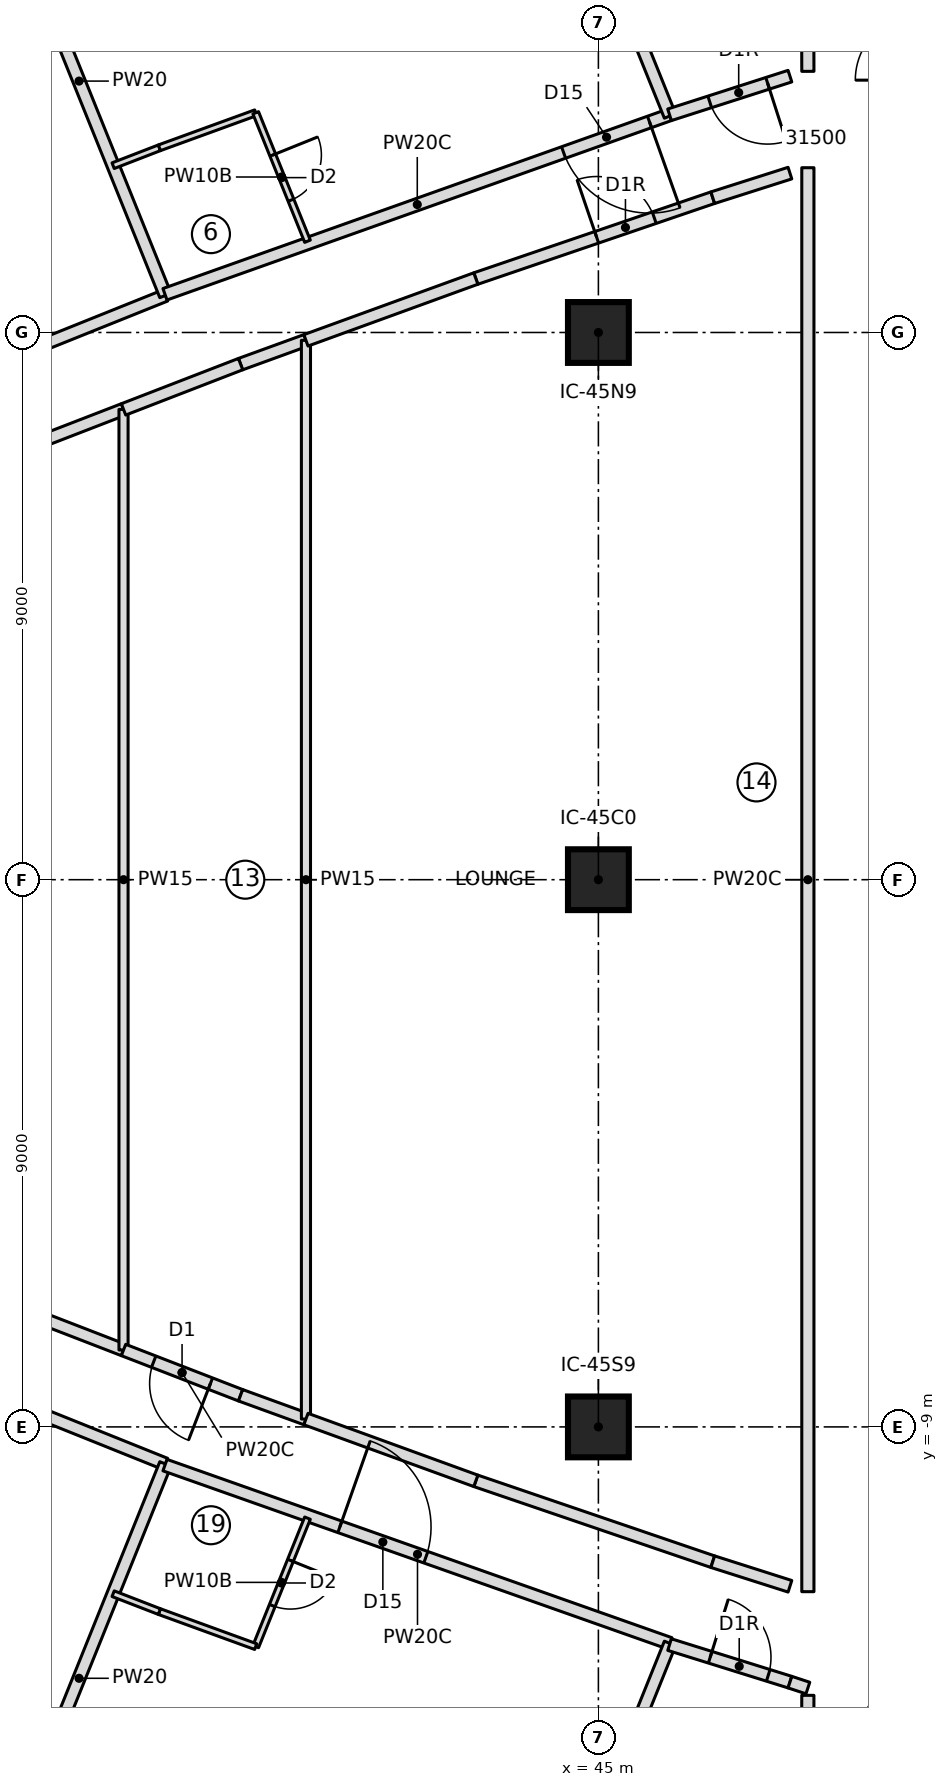
"""IFC4 building model, lengths in metres.
Left out: names, types, materials, properties, quantities, classifications, styles, units other than length and angle.
Written with IfcOpenShell. Run it as: python <this file> out.ifc"""

import sys

from ifc_helpers import new_model, si_unit, direction, frame, frame_2d, origin, origin_2d, place, context, subcontext, project, spatial, rectangle, extrude, element, fill, save


model = new_model("IFC4")
c1 = context("Model", 3, precision=1e-05, world=origin(), true_north=direction((0.0, 1.0)))
c2 = subcontext(c1, "Body", "Model", "MODEL_VIEW")
j1 = project(units=[si_unit("LENGTHUNIT", "METRE"), si_unit("PLANEANGLEUNIT", "RADIAN")], contexts=[c1])
p1 = place(None, origin())
s1 = spatial("IfcSite", under=j1, at=p1, CompositionType="ELEMENT")
p2 = place(p1, origin())
s2 = spatial("IfcBuilding", under=s1, at=p2, CompositionType="ELEMENT")
p3 = place(p2, frame((0.0, 0.0, 196.8)))
s3 = spatial("IfcBuildingStorey", under=s2, at=p3, CompositionType="ELEMENT", Elevation=196.8)
for number, where, z_axis, x_axis in (
    (1, (45.0, -9.0, 0.0), (0.0, 0.0, 1.0), (1.0, 0.0, 0.0)),
    (2, (45.0, 0.0, 0.0), (0.0, 0.0, 1.0), (1.0, 0.0, 0.0)),
    (3, (45.0, 9.0, 0.0), (0.0, 0.0, 1.0), (1.0, 0.0, 0.0)),
):
    element("IfcColumn", number, at=place(p3, frame(where, z_axis=z_axis, x_axis=x_axis)), inside=s3, PredefinedType="COLUMN", context=c2, shape_type="SweptSolid", body=[
        extrude(rectangle(XDim=1.0, YDim=1.0, at=origin_2d()), origin(), (0.0, 0.0, 1.0), 3.55),
    ])
p4 = place(p3, frame((29.714, 6.329, 0.0), z_axis=(0.0, 0.0, 1.0), x_axis=(0.927886226391, 0.372863448026, 0.0)))
e4 = element("IfcWall", 4, at=p4, inside=s3, PredefinedType="PARTITIONING", context=c2, shape_type="SweptSolid", body=[
    extrude(rectangle(XDim=8.8, YDim=0.2, at=frame_2d((4.4, 0.0))), origin(), (0.0, 0.0, 1.0), 3.25),
])
p5 = place(p4, frame((3.25, 0.0, 0.0)))
e5 = element("IfcOpeningElement", 5, at=p5, cuts=e4, PredefinedType="OPENING", context=c2, shape_type="SweptSolid", body=[
    extrude(rectangle(XDim=1.0, YDim=2.1, at=frame_2d((0.5, 1.05))), frame((0.0, 0.11, 0.0), z_axis=(0.0, -1.0, 0.0), x_axis=(1.0, 0.0, 0.0)), (0.0, 0.0, 1.0), 0.22),
])
p6 = place(p3, frame((37.88, 9.61, 0.0), z_axis=(0.0, 0.0, 1.0), x_axis=(-0.373892577014, 0.927472016211, 0.0)))
e6 = element("IfcWall", 6, at=p6, inside=s3, PredefinedType="PARTITIONING", context=c2, shape_type="SweptSolid", body=[
    extrude(rectangle(XDim=7.601, YDim=0.2, at=frame_2d((3.8, 0.0))), origin(), (0.0, 0.0, 1.0), 3.25),
])
p7 = place(p3, frame((46.17, 12.58, 0.0), z_axis=(0.0, 0.0, 1.0), x_axis=(-0.942170738702, -0.335133255786, 0.0)))
e7 = element("IfcWall", 7, at=p7, inside=s3, PredefinedType="PARTITIONING", context=c2, shape_type="SweptSolid", body=[
    extrude(rectangle(XDim=8.807, YDim=0.2, at=frame_2d((4.404, 0.0))), origin(), (0.0, 0.0, 1.0), 3.25),
])
p8 = place(p7, frame((0.35, 0.0, 0.0)))
e8 = element("IfcOpeningElement", 8, at=p8, cuts=e7, PredefinedType="OPENING", context=c2, shape_type="SweptSolid", body=[
    extrude(rectangle(XDim=1.5, YDim=2.1, at=frame_2d((0.75, 1.05))), frame((0.0, 0.11, 0.0), z_axis=(0.0, -1.0, 0.0), x_axis=(1.0, 0.0, 0.0)), (0.0, 0.0, 1.0), 0.22),
])
p9 = place(p3, frame((37.02, 11.743, 0.0), z_axis=(0.0, 0.0, 1.0), x_axis=(0.9326493613, 0.360784102846, 0.0)))
e9 = element("IfcWall", 9, at=p9, inside=s3, PredefinedType="PARTITIONING", context=c2, shape_type="SweptSolid", body=[
    extrude(rectangle(XDim=0.815, YDim=0.1, at=frame_2d((0.408, 0.0))), origin(), (0.0, 0.0, 1.0), 3.25),
])
p10 = place(p3, frame((37.78, 12.037, 0.0), z_axis=(0.0, 0.0, 1.0), x_axis=(0.939759586286, 0.341836101053, 0.0)))
e10 = element("IfcWall", 10, at=p10, inside=s3, PredefinedType="PARTITIONING", context=c2, shape_type="SweptSolid", body=[
    extrude(rectangle(XDim=1.686, YDim=0.1, at=frame_2d((0.843, 0.0))), origin(), (0.0, 0.0, 1.0), 3.25),
])
p11 = place(p3, frame((39.364, 12.614, 0.0), z_axis=(0.0, 0.0, 1.0), x_axis=(0.373883593317, -0.927475637765, 0.0)))
e11 = element("IfcWall", 11, at=p11, inside=s3, PredefinedType="PARTITIONING", context=c2, shape_type="SweptSolid", body=[
    extrude(rectangle(XDim=2.278, YDim=0.1, at=frame_2d((1.139, 0.0))), origin(), (0.0, 0.0, 1.0), 3.25),
])
p12 = place(p11, frame((0.75, 0.0, 0.0)))
e12 = element("IfcOpeningElement", 12, at=p12, cuts=e11, PredefinedType="OPENING", context=c2, shape_type="SweptSolid", body=[
    extrude(rectangle(XDim=0.8, YDim=2.1, at=frame_2d((0.4, 1.05))), frame((0.0, 0.06, 0.0), z_axis=(0.0, -1.0, 0.0), x_axis=(1.0, 0.0, 0.0)), (0.0, 0.0, 1.0), 0.12),
])
p13 = place(p3, frame((46.178, 12.562, 0.0), z_axis=(0.0, 0.0, 1.0), x_axis=(-0.373905590149, 0.927466770108, 0.0)))
e13 = element("IfcWall", 13, at=p13, inside=s3, PredefinedType="PARTITIONING", context=c2, shape_type="SweptSolid", body=[
    extrude(rectangle(XDim=7.611, YDim=0.2, at=frame_2d((3.806, 0.0))), origin(), (0.0, 0.0, 1.0), 3.25),
])
p14 = place(p3, frame((29.714, -6.329, 0.0), z_axis=(0.0, 0.0, 1.0), x_axis=(0.927886226391, -0.372863448026, 0.0)))
e14 = element("IfcWall", 14, at=p14, inside=s3, PredefinedType="PARTITIONING", context=c2, shape_type="SweptSolid", body=[
    extrude(rectangle(XDim=8.8, YDim=0.2, at=frame_2d((4.4, 0.0))), origin(), (0.0, 0.0, 1.0), 3.25),
])
p15 = place(p14, frame((3.25, 0.0, 0.0)))
e15 = element("IfcOpeningElement", 15, at=p15, cuts=e14, PredefinedType="OPENING", context=c2, shape_type="SweptSolid", body=[
    extrude(rectangle(XDim=1.0, YDim=2.1, at=frame_2d((0.5, 1.05))), frame((0.0, 0.11, 0.0), z_axis=(0.0, -1.0, 0.0), x_axis=(1.0, 0.0, 0.0)), (0.0, 0.0, 1.0), 0.22),
])
p16 = place(p3, frame((35.038, -16.659, 0.0), z_axis=(0.0, 0.0, 1.0), x_axis=(0.373892577014, 0.927472016211, 0.0)))
e16 = element("IfcWall", 16, at=p16, inside=s3, PredefinedType="PARTITIONING", context=c2, shape_type="SweptSolid", body=[
    extrude(rectangle(XDim=7.601, YDim=0.2, at=frame_2d((3.8, 0.0))), origin(), (0.0, 0.0, 1.0), 3.25),
])
p17 = place(p3, frame((37.872, -9.628, 0.0), z_axis=(0.0, 0.0, 1.0), x_axis=(0.9429299378, -0.332991189675, 0.0)))
e17 = element("IfcWall", 17, at=p17, inside=s3, PredefinedType="PARTITIONING", context=c2, shape_type="SweptSolid", body=[
    extrude(rectangle(XDim=8.808, YDim=0.2, at=frame_2d((4.404, 0.0))), origin(), (0.0, 0.0, 1.0), 3.25),
])
p18 = place(p17, frame((3.05, 0.0, 0.0)))
e18 = element("IfcOpeningElement", 18, at=p18, cuts=e17, PredefinedType="OPENING", context=c2, shape_type="SweptSolid", body=[
    extrude(rectangle(XDim=1.5, YDim=2.1, at=frame_2d((0.75, 1.05))), frame((0.0, 0.11, 0.0), z_axis=(0.0, -1.0, 0.0), x_axis=(1.0, 0.0, 0.0)), (0.0, 0.0, 1.0), 0.22),
])
p19 = place(p3, frame((40.216, -10.5, 0.0), z_axis=(0.0, 0.0, 1.0), x_axis=(-0.373883593317, -0.927475637765, 0.0)))
e19 = element("IfcWall", 19, at=p19, inside=s3, PredefinedType="PARTITIONING", context=c2, shape_type="SweptSolid", body=[
    extrude(rectangle(XDim=2.278, YDim=0.1, at=frame_2d((1.139, 0.0))), origin(), (0.0, 0.0, 1.0), 3.25),
])
p20 = place(p19, frame((0.75, 0.0, 0.0)))
e20 = element("IfcOpeningElement", 20, at=p20, cuts=e19, PredefinedType="OPENING", context=c2, shape_type="SweptSolid", body=[
    extrude(rectangle(XDim=0.8, YDim=2.1, at=frame_2d((0.4, 1.05))), frame((0.0, 0.06, 0.0), z_axis=(0.0, -1.0, 0.0), x_axis=(1.0, 0.0, 0.0)), (0.0, 0.0, 1.0), 0.12),
])
p21 = place(p3, frame((39.364, -12.614, 0.0), z_axis=(0.0, 0.0, 1.0), x_axis=(-0.939759586286, 0.341836101053, 0.0)))
e21 = element("IfcWall", 21, at=p21, inside=s3, PredefinedType="PARTITIONING", context=c2, shape_type="SweptSolid", body=[
    extrude(rectangle(XDim=1.686, YDim=0.1, at=frame_2d((0.843, 0.0))), origin(), (0.0, 0.0, 1.0), 3.25),
])
p22 = place(p3, frame((37.78, -12.037, 0.0), z_axis=(0.0, 0.0, 1.0), x_axis=(-0.9326493613, 0.360784102846, 0.0)))
e22 = element("IfcWall", 22, at=p22, inside=s3, PredefinedType="PARTITIONING", context=c2, shape_type="SweptSolid", body=[
    extrude(rectangle(XDim=0.815, YDim=0.1, at=frame_2d((0.408, 0.0))), origin(), (0.0, 0.0, 1.0), 3.25),
])
p23 = place(p3, frame((43.332, -19.621, 0.0), z_axis=(0.0, 0.0, 1.0), x_axis=(0.373905590149, 0.927466770108, 0.0)))
e23 = element("IfcWall", 23, at=p23, inside=s3, PredefinedType="PARTITIONING", context=c2, shape_type="SweptSolid", body=[
    extrude(rectangle(XDim=7.611, YDim=0.2, at=frame_2d((3.806, 0.0))), origin(), (0.0, 0.0, 1.0), 3.25),
])
for number, where, z_axis, x_axis in (
    (24, (35.276, 6.994, 0.0), (0.0, 0.0, 1.0), (0.933, 0.361, 0.0)),
    (25, (37.19, -7.735, 0.0), (0.0, 0.0, 1.0), (-0.933, 0.361, 0.0)),
):
    element("IfcWall", number, at=place(p3, frame(where, z_axis=z_axis, x_axis=x_axis)), inside=s3, PredefinedType="PARTITIONING", context=c2, shape_type="SweptSolid", body=[
        extrude(rectangle(XDim=2.053, YDim=0.2, at=frame_2d((1.026, 0.0))), origin(), (0.0, 0.0, 1.0), 3.25),
    ])
p24 = place(p3, frame((37.19, -7.735, 0.0), z_axis=(0.0, 0.0, 1.0), x_axis=(0.0, 1.0, 0.0)))
e26 = element("IfcWall", 26, at=p24, inside=s3, PredefinedType="PARTITIONING", context=c2, shape_type="SweptSolid", body=[
    extrude(rectangle(XDim=15.47, YDim=0.15, at=frame_2d((7.735, 0.0))), origin(), (0.0, 0.0, 1.0), 3.25),
])
p25 = place(p3, frame((39.115, -8.479, 0.0), z_axis=(0.0, 0.0, 1.0), x_axis=(-0.9326579855, 0.360761807961, 0.0)))
e27 = element("IfcWall", 27, at=p25, inside=s3, PredefinedType="PARTITIONING", context=c2, shape_type="SweptSolid", body=[
    extrude(rectangle(XDim=2.064, YDim=0.2, at=frame_2d((1.032, 0.0))), origin(), (0.0, 0.0, 1.0), 3.25),
])
p26 = place(p25, frame((0.532, 0.0, 0.0)))
e28 = element("IfcOpeningElement", 28, at=p26, cuts=e27, PredefinedType="OPENING", context=c2, shape_type="SweptSolid", body=[
    extrude(rectangle(XDim=1.0, YDim=2.1, at=frame_2d((0.5, 1.05))), frame((0.0, 0.11, 0.0), z_axis=(0.0, -1.0, 0.0), x_axis=(1.0, 0.0, 0.0)), (0.0, 0.0, 1.0), 0.22),
])
for number, where, z_axis, x_axis in (
    (29, (39.115, 8.479, 0.0), (0.0, 0.0, 1.0), (0.94, 0.342, 0.0)),
    (30, (40.19, -8.871, 0.0), (0.0, 0.0, 1.0), (-0.94, 0.342, 0.0)),
):
    element("IfcWall", number, at=place(p3, frame(where, z_axis=z_axis, x_axis=x_axis)), inside=s3, PredefinedType="PARTITIONING", context=c2, shape_type="SweptSolid", body=[
        extrude(rectangle(XDim=1.144, YDim=0.2, at=frame_2d((0.572, 0.0))), origin(), (0.0, 0.0, 1.0), 3.25),
    ])
p27 = place(p3, frame((37.19, 7.735, 0.0), z_axis=(0.0, 0.0, 1.0), x_axis=(0.9326579855, 0.360761807961, 0.0)))
e31 = element("IfcWall", 31, at=p27, inside=s3, PredefinedType="PARTITIONING", context=c2, shape_type="SweptSolid", body=[
    extrude(rectangle(XDim=2.064, YDim=0.2, at=frame_2d((1.032, 0.0))), origin(), (0.0, 0.0, 1.0), 3.25),
])
p28 = place(p3, frame((40.19, -8.871, 0.0), z_axis=(0.0, 0.0, 1.0), x_axis=(0.0, 1.0, 0.0)))
e32 = element("IfcWall", 32, at=p28, inside=s3, PredefinedType="PARTITIONING", context=c2, shape_type="SweptSolid", body=[
    extrude(rectangle(XDim=17.741, YDim=0.15, at=frame_2d((8.871, 0.0))), origin(), (0.0, 0.0, 1.0), 3.25),
])
p29 = place(p3, frame((42.984, 9.887, 0.0), z_axis=(0.0, 0.0, 1.0), x_axis=(0.946436071896, 0.322891253852, 0.0)))
e33 = element("IfcWall", 33, at=p29, inside=s3, PredefinedType="PARTITIONING", context=c2, shape_type="SweptSolid", body=[
    extrude(rectangle(XDim=4.117, YDim=0.2, at=frame_2d((2.059, 0.0))), origin(), (0.0, 0.0, 1.0), 3.25),
])
p30 = place(p29, frame((2.1, 0.0, 0.0)))
e34 = element("IfcOpeningElement", 34, at=p30, cuts=e33, PredefinedType="OPENING", context=c2, shape_type="SweptSolid", body=[
    extrude(rectangle(XDim=1.0, YDim=2.1, at=frame_2d((0.5, 1.05))), frame((0.0, 0.11, 0.0), z_axis=(0.0, -1.0, 0.0), x_axis=(1.0, 0.0, 0.0)), (0.0, 0.0, 1.0), 0.22),
])
p31 = place(p3, frame((46.881, -11.217, 0.0), z_axis=(0.0, 0.0, 1.0), x_axis=(-0.946436071896, 0.322891253852, 0.0)))
e35 = element("IfcWall", 35, at=p31, inside=s3, PredefinedType="PARTITIONING", context=c2, shape_type="SweptSolid", body=[
    extrude(rectangle(XDim=4.117, YDim=0.2, at=frame_2d((2.059, 0.0))), origin(), (0.0, 0.0, 1.0), 3.25),
])
for number, where, z_axis, x_axis in (
    (36, (42.984, -9.887, 0.0), (0.0, 0.0, 1.0), (-0.94, 0.342, 0.0)),
    (37, (40.19, 8.871, 0.0), (0.0, 0.0, 1.0), (0.94, 0.342, 0.0)),
):
    element("IfcWall", number, at=place(p3, frame(where, z_axis=z_axis, x_axis=x_axis)), inside=s3, PredefinedType="PARTITIONING", context=c2, shape_type="SweptSolid", body=[
        extrude(rectangle(XDim=2.973, YDim=0.2, at=frame_2d((1.487, 0.0))), origin(), (0.0, 0.0, 1.0), 3.25),
    ])
p32 = place(p3, frame((48.15, 13.216, 0.0), z_axis=(0.0, 0.0, 1.0), x_axis=(-0.952101841283, -0.305781104428, 0.0)))
e38 = element("IfcWall", 38, at=p32, inside=s3, PredefinedType="PARTITIONING", context=c2, shape_type="SweptSolid", body=[
    extrude(rectangle(XDim=2.079, YDim=0.2, at=frame_2d((1.04, 0.0))), origin(), (0.0, 0.0, 1.0), 3.25),
])
p33 = place(p32, frame((0.385, 0.0, 0.0)))
e39 = element("IfcOpeningElement", 39, at=p33, cuts=e38, PredefinedType="OPENING", context=c2, shape_type="SweptSolid", body=[
    extrude(rectangle(XDim=1.0, YDim=2.1, at=frame_2d((0.5, 1.05))), frame((0.0, 0.11, 0.0), z_axis=(0.0, -1.0, 0.0), x_axis=(1.0, 0.0, 0.0)), (0.0, 0.0, 1.0), 0.22),
])
p34 = place(p3, frame((46.17, -12.58, 0.0), z_axis=(0.0, 0.0, 1.0), x_axis=(0.954639063921, -0.297765440634, 0.0)))
e40 = element("IfcWall", 40, at=p34, inside=s3, PredefinedType="PARTITIONING", context=c2, shape_type="SweptSolid", body=[
    extrude(rectangle(XDim=2.073, YDim=0.2, at=frame_2d((1.037, 0.0))), origin(), (0.0, 0.0, 1.0), 3.25),
])
p35 = place(p34, frame((0.7, 0.0, 0.0)))
e41 = element("IfcOpeningElement", 41, at=p35, cuts=e40, PredefinedType="OPENING", context=c2, shape_type="SweptSolid", body=[
    extrude(rectangle(XDim=1.0, YDim=2.1, at=frame_2d((0.5, 1.05))), frame((0.0, 0.11, 0.0), z_axis=(0.0, -1.0, 0.0), x_axis=(1.0, 0.0, 0.0)), (0.0, 0.0, 1.0), 0.22),
])
for number, where, z_axis, x_axis in (
    (42, (46.881, 11.217, 0.0), (0.0, 0.0, 1.0), (0.953, 0.304, 0.0)),
    (43, (48.15, -11.621, 0.0), (0.0, 0.0, 1.0), (-0.953, 0.304, 0.0)),
):
    element("IfcWall", number, at=place(p3, frame(where, z_axis=z_axis, x_axis=x_axis)), inside=s3, PredefinedType="PARTITIONING", context=c2, shape_type="SweptSolid", body=[
        extrude(rectangle(XDim=1.332, YDim=0.2, at=frame_2d((0.666, 0.0))), origin(), (0.0, 0.0, 1.0), 3.25),
    ])
p36 = place(p3, frame((48.445, 11.71, 0.0), z_axis=(0.0, 0.0, 1.0), x_axis=(0.0, -1.0, 0.0)))
e44 = element("IfcWall", 44, at=p36, inside=s3, PredefinedType="PARTITIONING", context=c2, shape_type="SweptSolid", body=[
    extrude(rectangle(XDim=23.42, YDim=0.2, at=frame_2d((11.71, 0.0))), origin(), (0.0, 0.0, 1.0), 3.25),
])
p37 = place(p3, frame((48.429, 18.816, 0.0), z_axis=(0.0, 0.0, 1.0), x_axis=(0.002918533604, -0.999995741072, 0.0)))
e45 = element("IfcWall", 45, at=p37, inside=s3, PredefinedType="PARTITIONING", context=c2, shape_type="SweptSolid", body=[
    extrude(rectangle(XDim=5.521, YDim=0.2, at=frame_2d((2.76, 0.0))), origin(), (0.0, 0.0, 1.0), 3.25),
])
p38 = place(p3, frame((48.15, -13.198, 0.0), z_axis=(0.0, 0.0, 1.0), x_axis=(0.949621636458, -0.313398703843, 0.0)))
e46 = element("IfcWall", 46, at=p38, inside=s3, PredefinedType="PARTITIONING", context=c2, shape_type="SweptSolid", body=[
    extrude(rectangle(XDim=0.311, YDim=0.2, at=frame_2d((0.155, 0.0))), origin(), (0.0, 0.0, 1.0), 3.25),
])
p39 = place(p3, frame((48.445, -13.415, 0.0), z_axis=(0.0, 0.0, 1.0), x_axis=(-0.002938106018, -0.999995683757, 0.0)))
e47 = element("IfcWall", 47, at=p39, inside=s3, PredefinedType="PARTITIONING", context=c2, shape_type="SweptSolid", body=[
    extrude(rectangle(XDim=5.401, YDim=0.2, at=frame_2d((2.701, 0.0))), origin(), (0.0, 0.0, 1.0), 3.25),
])
p40 = place(p12, origin())
e48 = element("IfcDoor", 48, at=p40, inside=s3, OperationType="SINGLE_SWING_LEFT", PredefinedType="DOOR", context=c2, shape_type="SweptSolid", body=[
    extrude(rectangle(XDim=0.8, YDim=2.1, at=frame_2d((0.4, 1.05))), frame((0.0, 0.025, 0.0), z_axis=(0.0, -1.0, 0.0), x_axis=(1.0, 0.0, 0.0)), (0.0, 0.0, 1.0), 0.05),
])
fill(e12, e48)
p41 = place(p8, origin())
e49 = element("IfcDoor", 49, at=p41, inside=s3, OperationType="DOUBLE_DOOR_SINGLE_SWING", PredefinedType="DOOR", context=c2, shape_type="SweptSolid", body=[
    extrude(rectangle(XDim=1.5, YDim=2.1, at=frame_2d((0.75, 1.05))), frame((0.0, 0.025, 0.0), z_axis=(0.0, -1.0, 0.0), x_axis=(1.0, 0.0, 0.0)), (0.0, 0.0, 1.0), 0.05),
])
fill(e8, e49)
p42 = place(p33, origin())
e50 = element("IfcDoor", 50, at=p42, inside=s3, OperationType="SINGLE_SWING_RIGHT", PredefinedType="DOOR", context=c2, shape_type="SweptSolid", body=[
    extrude(rectangle(XDim=1.0, YDim=2.1, at=frame_2d((0.5, 1.05))), frame((0.0, 0.025, 0.0), z_axis=(0.0, -1.0, 0.0), x_axis=(1.0, 0.0, 0.0)), (0.0, 0.0, 1.0), 0.05),
])
fill(e39, e50)
p43 = place(p20, origin())
e51 = element("IfcDoor", 51, at=p43, inside=s3, OperationType="SINGLE_SWING_LEFT", PredefinedType="DOOR", context=c2, shape_type="SweptSolid", body=[
    extrude(rectangle(XDim=0.8, YDim=2.1, at=frame_2d((0.4, 1.05))), frame((0.0, 0.025, 0.0), z_axis=(0.0, -1.0, 0.0), x_axis=(1.0, 0.0, 0.0)), (0.0, 0.0, 1.0), 0.05),
])
fill(e20, e51)
p44 = place(p18, origin())
e52 = element("IfcDoor", 52, at=p44, inside=s3, OperationType="DOUBLE_DOOR_SINGLE_SWING", PredefinedType="DOOR", context=c2, shape_type="SweptSolid", body=[
    extrude(rectangle(XDim=1.5, YDim=2.1, at=frame_2d((0.75, 1.05))), frame((0.0, 0.025, 0.0), z_axis=(0.0, -1.0, 0.0), x_axis=(1.0, 0.0, 0.0)), (0.0, 0.0, 1.0), 0.05),
])
fill(e18, e52)
p45 = place(p35, origin())
e53 = element("IfcDoor", 53, at=p45, inside=s3, OperationType="SINGLE_SWING_RIGHT", PredefinedType="DOOR", context=c2, shape_type="SweptSolid", body=[
    extrude(rectangle(XDim=1.0, YDim=2.1, at=frame_2d((0.5, 1.05))), frame((0.0, 0.025, 0.0), z_axis=(0.0, -1.0, 0.0), x_axis=(1.0, 0.0, 0.0)), (0.0, 0.0, 1.0), 0.05),
])
fill(e41, e53)
p46 = place(p26, origin())
e54 = element("IfcDoor", 54, at=p46, inside=s3, OperationType="SINGLE_SWING_LEFT", PredefinedType="DOOR", context=c2, shape_type="SweptSolid", body=[
    extrude(rectangle(XDim=1.0, YDim=2.1, at=frame_2d((0.5, 1.05))), frame((0.0, 0.025, 0.0), z_axis=(0.0, -1.0, 0.0), x_axis=(1.0, 0.0, 0.0)), (0.0, 0.0, 1.0), 0.05),
])
fill(e28, e54)
p47 = place(p30, origin())
e55 = element("IfcDoor", 55, at=p47, inside=s3, OperationType="SINGLE_SWING_RIGHT", PredefinedType="DOOR", context=c2, shape_type="SweptSolid", body=[
    extrude(rectangle(XDim=1.0, YDim=2.1, at=frame_2d((0.5, 1.05))), frame((0.0, 0.025, 0.0), z_axis=(0.0, -1.0, 0.0), x_axis=(1.0, 0.0, 0.0)), (0.0, 0.0, 1.0), 0.05),
])
fill(e34, e55)
save(model, sys.argv[1])
